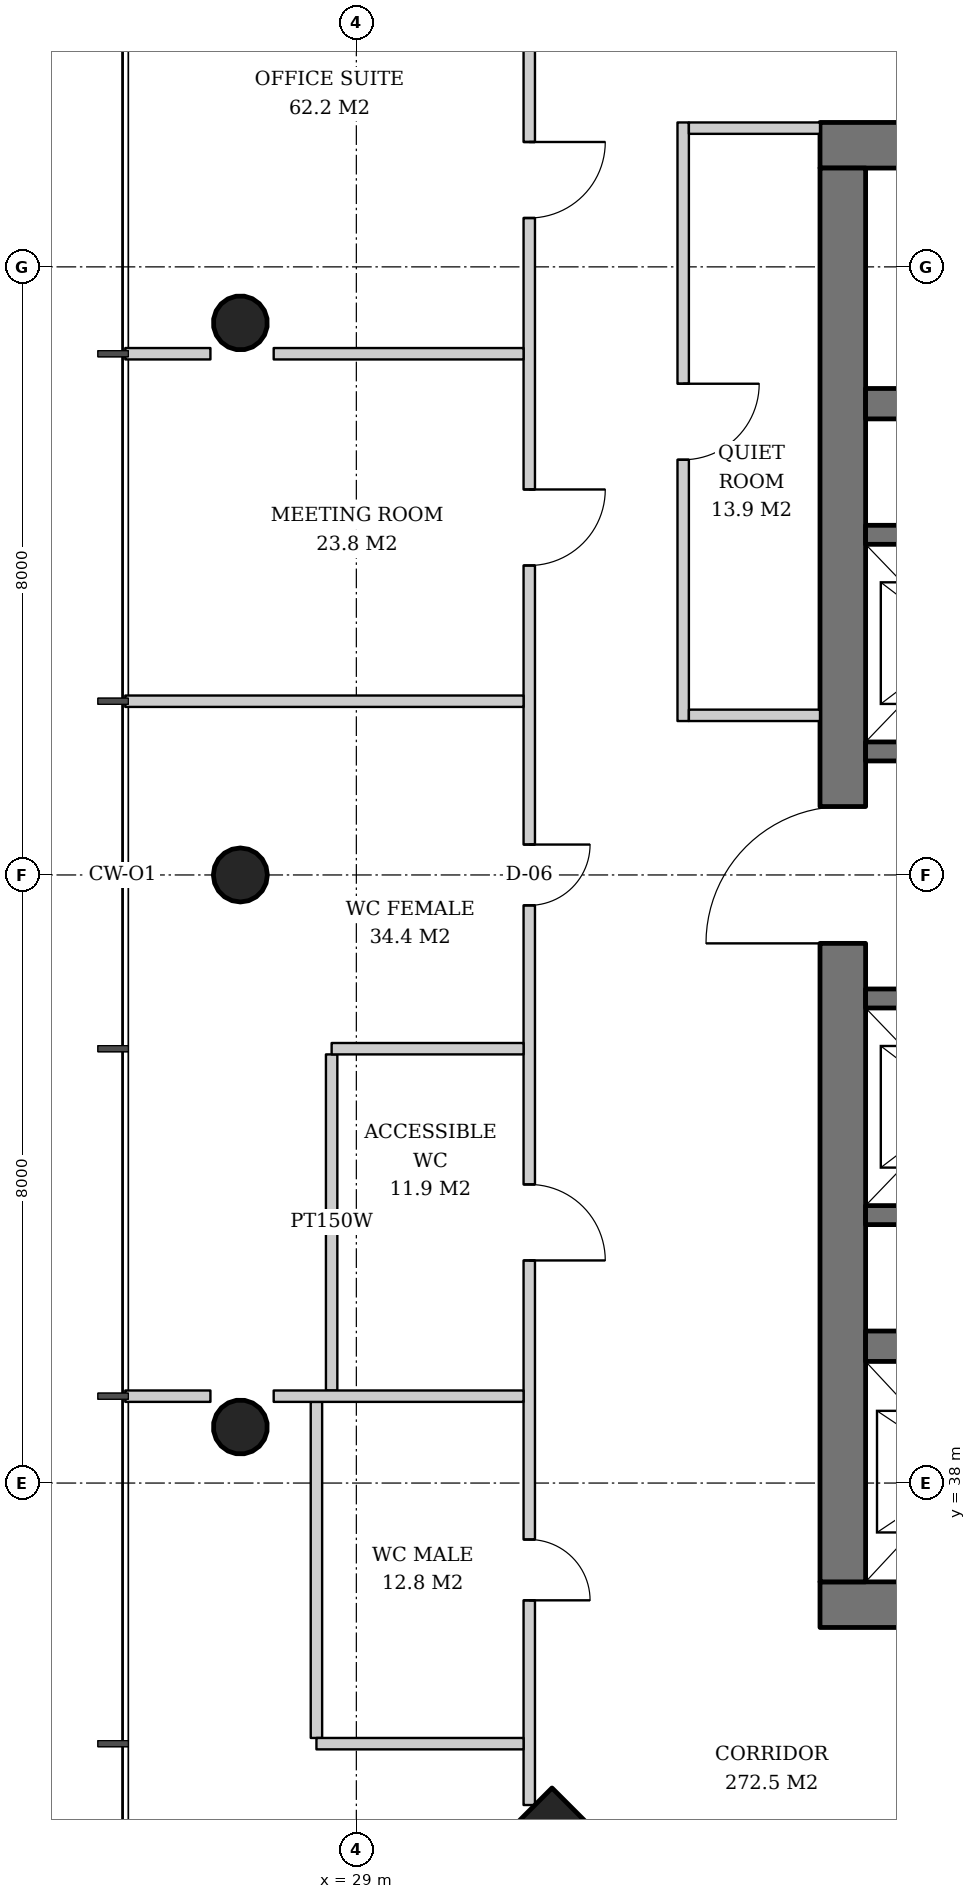
"""IFC4 building model, lengths in metres.
Left out: names, types, materials, properties, quantities, classifications, styles, units other than length and angle.
Written with IfcOpenShell. Run it as: python <this file> out.ifc"""

import sys

from ifc_helpers import new_model, si_unit, direction, frame, frame_2d, origin, origin_2d, place, context, subcontext, project, spatial, rectangle, hollow_circle, extrude, element, fill, save


model = new_model("IFC4")
c1 = context("Model", 3, precision=1e-05, world=origin(), true_north=direction((0.0, 1.0)))
c2 = subcontext(c1, "Body", "Model", "MODEL_VIEW")
j1 = project(units=[si_unit("LENGTHUNIT", "METRE"), si_unit("PLANEANGLEUNIT", "RADIAN")], contexts=[c1])
p1 = place(None, origin())
s1 = spatial("IfcSite", under=j1, at=p1, CompositionType="ELEMENT")
p2 = place(p1, origin())
s2 = spatial("IfcBuilding", under=s1, at=p2, CompositionType="ELEMENT")
p3 = place(p2, frame((0.0, 0.0, 222.4)))
s3 = spatial("IfcBuildingStorey", under=s2, at=p3, CompositionType="ELEMENT", Elevation=222.4)
p4 = place(p3, frame((31.536, 32.536, 0.0), z_axis=(0.031962158256, 0.031962158256, 0.998977898093), x_axis=(-0.707106781187, 0.707106781187, 0.0)))
e1 = element("IfcColumn", 1, at=p4, inside=s3, PredefinedType="COLUMN", context=c2, shape_type="SweptSolid", body=[
    extrude(rectangle(XDim=2.0, YDim=2.0, at=origin_2d()), origin(), (0.0, 0.0, 1.0), 3.804),
])
p5 = place(p3, frame((27.436, 53.282, 0.0), z_axis=(0.031910269556, -0.015987237665, 0.999362868496), x_axis=(0.447933021895, 0.894067115991, 0.0)))
e2 = element("IfcColumn", 2, at=p5, inside=s3, PredefinedType="COLUMN", context=c2, shape_type="SweptSolid", body=[
    extrude(hollow_circle(Radius=0.355, WallThickness=0.025, at=origin_2d()), origin(), (0.0, 0.0, 1.0), 3.802),
])
p6 = place(p3, frame((27.436, 46.0, 0.0), z_axis=(0.031914348339, 0.0, 0.999490607445), x_axis=(0.0, 1.0, 0.0)))
e3 = element("IfcColumn", 3, at=p6, inside=s3, PredefinedType="COLUMN", context=c2, shape_type="SweptSolid", body=[
    extrude(hollow_circle(Radius=0.355, WallThickness=0.025, at=origin_2d()), origin(), (0.0, 0.0, 1.0), 3.802),
])
p7 = place(p3, frame((27.436, 38.718, 0.0), z_axis=(0.031910269556, 0.015987237665, 0.999362868496), x_axis=(-0.447933021895, 0.894067115991, 0.0)))
e4 = element("IfcColumn", 4, at=p7, inside=s3, PredefinedType="COLUMN", context=c2, shape_type="SweptSolid", body=[
    extrude(hollow_circle(Radius=0.355, WallThickness=0.025, at=origin_2d()), origin(), (0.0, 0.0, 1.0), 3.802),
])
p8 = place(p3, frame((35.1, 36.4, 0.0), z_axis=(0.0, 0.0, 1.0), x_axis=(1.0, 0.0, 0.0)))
e5 = element("IfcWall", 5, at=p8, inside=s3, PredefinedType="SHEAR", context=c2, shape_type="SweptSolid", body=[
    extrude(rectangle(XDim=19.8, YDim=0.6, at=frame_2d((9.9, 0.0))), origin(), (0.0, 0.0, 1.0), 3.8),
])
p9 = place(p8, frame((3.9, 0.0, 0.0)))
e6 = element("IfcOpeningElement", 6, at=p9, cuts=e5, PredefinedType="OPENING", context=c2, shape_type="SweptSolid", body=[
    extrude(rectangle(XDim=1.0, YDim=2.1, at=frame_2d((0.5, 1.05))), frame((0.0, 0.31, 0.0), z_axis=(0.0, -1.0, 0.0), x_axis=(1.0, 0.0, 0.0)), (0.0, 0.0, 1.0), 0.62),
])
p10 = place(p8, frame((15.35, 0.0, 0.0)))
e7 = element("IfcOpeningElement", 7, at=p10, cuts=e5, PredefinedType="OPENING", context=c2, shape_type="SweptSolid", body=[
    extrude(rectangle(XDim=1.0, YDim=2.1, at=frame_2d((0.5, 1.05))), frame((0.0, 0.31, 0.0), z_axis=(0.0, -1.0, 0.0), x_axis=(1.0, 0.0, 0.0)), (0.0, 0.0, 1.0), 0.62),
])
p11 = place(p3, frame((35.1, 55.6, 0.0), z_axis=(0.0, 0.0, 1.0), x_axis=(1.0, 0.0, 0.0)))
e8 = element("IfcWall", 8, at=p11, inside=s3, PredefinedType="SHEAR", context=c2, shape_type="SweptSolid", body=[
    extrude(rectangle(XDim=19.8, YDim=0.6, at=frame_2d((9.9, 0.0))), origin(), (0.0, 0.0, 1.0), 3.8),
])
p12 = place(p11, frame((14.54, 0.0, 0.0)))
e9 = element("IfcOpeningElement", 9, at=p12, cuts=e8, PredefinedType="OPENING", context=c2, shape_type="SweptSolid", body=[
    extrude(rectangle(XDim=1.0, YDim=2.1, at=frame_2d((0.5, 1.05))), frame((0.0, 0.31, 0.0), z_axis=(0.0, -1.0, 0.0), x_axis=(1.0, 0.0, 0.0)), (0.0, 0.0, 1.0), 0.62),
])
p13 = place(p11, frame((1.8, 0.0, 0.0)))
e10 = element("IfcOpeningElement", 10, at=p13, cuts=e8, PredefinedType="OPENING", context=c2, shape_type="SweptSolid", body=[
    extrude(rectangle(XDim=1.0, YDim=2.1, at=frame_2d((0.5, 1.05))), frame((0.0, 0.31, 0.0), z_axis=(0.0, -1.0, 0.0), x_axis=(1.0, 0.0, 0.0)), (0.0, 0.0, 1.0), 0.62),
])
p14 = place(p11, frame((3.913, 0.0, 0.0)))
e11 = element("IfcOpeningElement", 11, at=p14, cuts=e8, PredefinedType="OPENING", context=c2, shape_type="SweptSolid", body=[
    extrude(rectangle(XDim=1.0, YDim=2.1, at=frame_2d((0.5, 1.05))), frame((0.0, 0.31, 0.0), z_axis=(0.0, -1.0, 0.0), x_axis=(1.0, 0.0, 0.0)), (0.0, 0.0, 1.0), 0.62),
])
p15 = place(p3, frame((35.4, 36.7, 0.0), z_axis=(0.0, 0.0, 1.0), x_axis=(0.0, 1.0, 0.0)))
e12 = element("IfcWall", 12, at=p15, inside=s3, PredefinedType="SHEAR", context=c2, shape_type="SweptSolid", body=[
    extrude(rectangle(XDim=18.6, YDim=0.6, at=frame_2d((9.3, 0.0))), origin(), (0.0, 0.0, 1.0), 3.8),
])
p16 = place(p15, frame((8.4, 0.0, 0.0)))
e13 = element("IfcOpeningElement", 13, at=p16, cuts=e12, PredefinedType="OPENING", context=c2, shape_type="SweptSolid", body=[
    extrude(rectangle(XDim=1.8, YDim=2.4, at=frame_2d((0.9, 1.2))), frame((0.0, 0.31, 0.0), z_axis=(0.0, -1.0, 0.0), x_axis=(1.0, 0.0, 0.0)), (0.0, 0.0, 1.0), 0.62),
])
for number, where, z_axis, x_axis in (
    (14, (35.7, 39.8, 0.0), (0.0, 0.0, 1.0), (1.0, 0.0, 0.0)),
    (15, (35.7, 52.2, 0.0), (0.0, 0.0, 1.0), (1.0, 0.0, 0.0)),
):
    element("IfcWall", number, at=place(p3, frame(where, z_axis=z_axis, x_axis=x_axis)), inside=s3, PredefinedType="SHEAR", context=c2, shape_type="SweptSolid", body=[
        extrude(rectangle(XDim=18.6, YDim=0.4, at=frame_2d((9.3, 0.0))), origin(), (0.0, 0.0, 1.0), 3.8),
    ])
p17 = place(p3, frame((35.7, 50.475, 0.0), z_axis=(0.0, 0.0, 1.0), x_axis=(1.0, 0.0, 0.0)))
e16 = element("IfcWall", 16, at=p17, inside=s3, PredefinedType="SHEAR", context=c2, shape_type="SweptSolid", body=[
    extrude(rectangle(XDim=11.0, YDim=0.25, at=frame_2d((5.5, 0.0))), origin(), (0.0, 0.0, 1.0), 3.8),
])
p18 = place(p3, frame((35.7, 47.625, 0.0), z_axis=(0.0, 0.0, 1.0), x_axis=(1.0, 0.0, 0.0)))
e17 = element("IfcWall", 17, at=p18, inside=s3, PredefinedType="SHEAR", context=c2, shape_type="SweptSolid", body=[
    extrude(rectangle(XDim=12.83, YDim=0.25, at=frame_2d((6.415, 0.0))), origin(), (0.0, 0.0, 1.0), 3.8),
])
p19 = place(p18, frame((0.7, 0.0, 0.0)))
e18 = element("IfcOpeningElement", 18, at=p19, cuts=e17, PredefinedType="OPENING", context=c2, shape_type="SweptSolid", body=[
    extrude(rectangle(XDim=1.1, YDim=2.2, at=frame_2d((0.55, 1.1))), frame((0.0, 0.135, 0.0), z_axis=(0.0, -1.0, 0.0), x_axis=(1.0, 0.0, 0.0)), (0.0, 0.0, 1.0), 0.27),
])
p20 = place(p18, frame((3.45, 0.0, 0.0)))
e19 = element("IfcOpeningElement", 19, at=p20, cuts=e17, PredefinedType="OPENING", context=c2, shape_type="SweptSolid", body=[
    extrude(rectangle(XDim=1.1, YDim=2.2, at=frame_2d((0.55, 1.1))), frame((0.0, 0.135, 0.0), z_axis=(0.0, -1.0, 0.0), x_axis=(1.0, 0.0, 0.0)), (0.0, 0.0, 1.0), 0.27),
])
p21 = place(p18, frame((6.2, 0.0, 0.0)))
e20 = element("IfcOpeningElement", 20, at=p21, cuts=e17, PredefinedType="OPENING", context=c2, shape_type="SweptSolid", body=[
    extrude(rectangle(XDim=1.1, YDim=2.2, at=frame_2d((0.55, 1.1))), frame((0.0, 0.135, 0.0), z_axis=(0.0, -1.0, 0.0), x_axis=(1.0, 0.0, 0.0)), (0.0, 0.0, 1.0), 0.27),
])
p22 = place(p18, frame((9.0, 0.0, 0.0)))
e21 = element("IfcOpeningElement", 21, at=p22, cuts=e17, PredefinedType="OPENING", context=c2, shape_type="SweptSolid", body=[
    extrude(rectangle(XDim=1.0, YDim=2.1, at=frame_2d((0.5, 1.05))), frame((0.0, 0.135, 0.0), z_axis=(0.0, -1.0, 0.0), x_axis=(1.0, 0.0, 0.0)), (0.0, 0.0, 1.0), 0.27),
])
p23 = place(p18, frame((11.515, 0.0, 0.0)))
e22 = element("IfcOpeningElement", 22, at=p23, cuts=e17, PredefinedType="OPENING", context=c2, shape_type="SweptSolid", body=[
    extrude(rectangle(XDim=0.8, YDim=2.0, at=frame_2d((0.4, 1.0))), frame((0.0, 0.135, 0.0), z_axis=(0.0, -1.0, 0.0), x_axis=(1.0, 0.0, 0.0)), (0.0, 0.0, 1.0), 0.27),
])
p24 = place(p3, frame((35.7, 41.525, 0.0), z_axis=(0.0, 0.0, 1.0), x_axis=(1.0, 0.0, 0.0)))
e23 = element("IfcWall", 23, at=p24, inside=s3, PredefinedType="SHEAR", context=c2, shape_type="SweptSolid", body=[
    extrude(rectangle(XDim=11.0, YDim=0.25, at=frame_2d((5.5, 0.0))), origin(), (0.0, 0.0, 1.0), 3.8),
])
p25 = place(p3, frame((35.7, 44.375, 0.0), z_axis=(0.0, 0.0, 1.0), x_axis=(1.0, 0.0, 0.0)))
e24 = element("IfcWall", 24, at=p25, inside=s3, PredefinedType="SHEAR", context=c2, shape_type="SweptSolid", body=[
    extrude(rectangle(XDim=12.83, YDim=0.25, at=frame_2d((6.415, 0.0))), origin(), (0.0, 0.0, 1.0), 3.8),
])
p26 = place(p25, frame((0.7, 0.0, 0.0)))
e25 = element("IfcOpeningElement", 25, at=p26, cuts=e24, PredefinedType="OPENING", context=c2, shape_type="SweptSolid", body=[
    extrude(rectangle(XDim=1.1, YDim=2.2, at=frame_2d((0.55, 1.1))), frame((0.0, 0.135, 0.0), z_axis=(0.0, -1.0, 0.0), x_axis=(1.0, 0.0, 0.0)), (0.0, 0.0, 1.0), 0.27),
])
p27 = place(p25, frame((3.45, 0.0, 0.0)))
e26 = element("IfcOpeningElement", 26, at=p27, cuts=e24, PredefinedType="OPENING", context=c2, shape_type="SweptSolid", body=[
    extrude(rectangle(XDim=1.1, YDim=2.2, at=frame_2d((0.55, 1.1))), frame((0.0, 0.135, 0.0), z_axis=(0.0, -1.0, 0.0), x_axis=(1.0, 0.0, 0.0)), (0.0, 0.0, 1.0), 0.27),
])
p28 = place(p25, frame((6.2, 0.0, 0.0)))
e27 = element("IfcOpeningElement", 27, at=p28, cuts=e24, PredefinedType="OPENING", context=c2, shape_type="SweptSolid", body=[
    extrude(rectangle(XDim=1.1, YDim=2.2, at=frame_2d((0.55, 1.1))), frame((0.0, 0.135, 0.0), z_axis=(0.0, -1.0, 0.0), x_axis=(1.0, 0.0, 0.0)), (0.0, 0.0, 1.0), 0.27),
])
p29 = place(p25, frame((9.0, 0.0, 0.0)))
e28 = element("IfcOpeningElement", 28, at=p29, cuts=e24, PredefinedType="OPENING", context=c2, shape_type="SweptSolid", body=[
    extrude(rectangle(XDim=1.0, YDim=2.1, at=frame_2d((0.5, 1.05))), frame((0.0, 0.135, 0.0), z_axis=(0.0, -1.0, 0.0), x_axis=(1.0, 0.0, 0.0)), (0.0, 0.0, 1.0), 0.27),
])
p30 = place(p25, frame((11.515, 0.0, 0.0)))
e29 = element("IfcOpeningElement", 29, at=p30, cuts=e24, PredefinedType="OPENING", context=c2, shape_type="SweptSolid", body=[
    extrude(rectangle(XDim=0.8, YDim=2.0, at=frame_2d((0.4, 1.0))), frame((0.0, 0.135, 0.0), z_axis=(0.0, -1.0, 0.0), x_axis=(1.0, 0.0, 0.0)), (0.0, 0.0, 1.0), 0.27),
])
p31 = place(p3, frame((33.3, 55.9, 0.0), z_axis=(0.0, 0.0, 1.0), x_axis=(0.0, -1.0, 0.0)))
e30 = element("IfcWall", 30, at=p31, inside=s3, PredefinedType="PARTITIONING", context=c2, shape_type="SweptSolid", body=[
    extrude(rectangle(XDim=7.875, YDim=0.15, at=frame_2d((3.938, 0.0))), origin(), (0.0, 0.0, 1.0), 2.706),
])
p32 = place(p31, frame((3.438, 0.0, 0.0)))
e31 = element("IfcOpeningElement", 31, at=p32, cuts=e30, PredefinedType="OPENING", context=c2, shape_type="SweptSolid", body=[
    extrude(rectangle(XDim=1.0, YDim=2.1, at=frame_2d((0.5, 1.05))), frame((0.0, 0.085, 0.0), z_axis=(0.0, -1.0, 0.0), x_axis=(1.0, 0.0, 0.0)), (0.0, 0.0, 1.0), 0.17),
])
p33 = place(p3, frame((35.1, 55.825, 0.0), z_axis=(0.0, 0.0, 1.0), x_axis=(-1.0, 0.0, 0.0)))
e32 = element("IfcWall", 32, at=p33, inside=s3, PredefinedType="PARTITIONING", context=c2, shape_type="SweptSolid", body=[
    extrude(rectangle(XDim=1.725, YDim=0.15, at=frame_2d((0.863, 0.0))), origin(), (0.0, 0.0, 1.0), 2.92),
])
p34 = place(p3, frame((35.1, 48.1, 0.0), z_axis=(0.0, 0.0, 1.0), x_axis=(-1.0, 0.0, 0.0)))
e33 = element("IfcWall", 33, at=p34, inside=s3, PredefinedType="PARTITIONING", context=c2, shape_type="SweptSolid", body=[
    extrude(rectangle(XDim=1.725, YDim=0.15, at=frame_2d((0.863, 0.0))), origin(), (0.0, 0.0, 1.0), 3.52),
])
p35 = place(p3, frame((28.675, 43.639, 0.0), z_axis=(0.0, 0.0, 1.0), x_axis=(0.0, -1.0, 0.0)))
e34 = element("IfcWall", 34, at=p35, inside=s3, PredefinedType="PARTITIONING", context=c2, shape_type="SweptSolid", body=[
    extrude(rectangle(XDim=4.422, YDim=0.15, at=frame_2d((2.211, 0.0))), origin(), (0.0, 0.0, 1.0), 2.706),
])
p36 = place(p3, frame((28.475, 39.068, 0.0), z_axis=(0.0, 0.0, 1.0), x_axis=(0.0, -1.0, 0.0)))
e35 = element("IfcWall", 35, at=p36, inside=s3, PredefinedType="PARTITIONING", context=c2, shape_type="SweptSolid", body=[
    extrude(rectangle(XDim=4.421, YDim=0.15, at=frame_2d((2.211, 0.0))), origin(), (0.0, 0.0, 1.0), 2.706),
])
p37 = place(p3, frame((31.275, 58.236, 0.0), z_axis=(0.0, 0.0, 1.0), x_axis=(0.0, -1.0, 0.0)))
e36 = element("IfcWall", 36, at=p37, inside=s3, PredefinedType="PARTITIONING", context=c2, shape_type="SweptSolid", body=[
    extrude(rectangle(XDim=24.472, YDim=0.15, at=frame_2d((12.236, 0.0))), origin(), (0.0, 0.0, 1.0), 2.706),
])
p38 = place(p37, frame((2.593, 0.0, 0.0)))
e37 = element("IfcOpeningElement", 37, at=p38, cuts=e36, PredefinedType="OPENING", context=c2, shape_type="SweptSolid", body=[
    extrude(rectangle(XDim=1.0, YDim=2.1, at=frame_2d((0.5, 1.05))), frame((0.0, 0.085, 0.0), z_axis=(0.0, -1.0, 0.0), x_axis=(1.0, 0.0, 0.0)), (0.0, 0.0, 1.0), 0.17),
])
p39 = place(p37, frame((7.164, 0.0, 0.0)))
e38 = element("IfcOpeningElement", 38, at=p39, cuts=e36, PredefinedType="OPENING", context=c2, shape_type="SweptSolid", body=[
    extrude(rectangle(XDim=1.0, YDim=2.1, at=frame_2d((0.5, 1.05))), frame((0.0, 0.085, 0.0), z_axis=(0.0, -1.0, 0.0), x_axis=(1.0, 0.0, 0.0)), (0.0, 0.0, 1.0), 0.17),
])
p40 = place(p37, frame((11.836, 0.0, 0.0)))
e39 = element("IfcOpeningElement", 39, at=p40, cuts=e36, PredefinedType="OPENING", context=c2, shape_type="SweptSolid", body=[
    extrude(rectangle(XDim=0.8, YDim=2.1, at=frame_2d((0.4, 1.05))), frame((0.0, 0.085, 0.0), z_axis=(0.0, -1.0, 0.0), x_axis=(1.0, 0.0, 0.0)), (0.0, 0.0, 1.0), 0.17),
])
p41 = place(p37, frame((16.307, 0.0, 0.0)))
e40 = element("IfcOpeningElement", 40, at=p41, cuts=e36, PredefinedType="OPENING", context=c2, shape_type="SweptSolid", body=[
    extrude(rectangle(XDim=1.0, YDim=2.1, at=frame_2d((0.5, 1.05))), frame((0.0, 0.085, 0.0), z_axis=(0.0, -1.0, 0.0), x_axis=(1.0, 0.0, 0.0)), (0.0, 0.0, 1.0), 0.17),
])
p42 = place(p37, frame((20.979, 0.0, 0.0)))
e41 = element("IfcOpeningElement", 41, at=p42, cuts=e36, PredefinedType="OPENING", context=c2, shape_type="SweptSolid", body=[
    extrude(rectangle(XDim=0.8, YDim=2.1, at=frame_2d((0.4, 1.05))), frame((0.0, 0.085, 0.0), z_axis=(0.0, -1.0, 0.0), x_axis=(1.0, 0.0, 0.0)), (0.0, 0.0, 1.0), 0.17),
])
p43 = place(p3, frame((31.2, 52.857, 0.0), z_axis=(0.0, 0.0, 1.0), x_axis=(-1.0, 0.0, 0.0)))
e42 = element("IfcWall", 42, at=p43, inside=s3, PredefinedType="PARTITIONING", context=c2, shape_type="SweptSolid", body=[
    extrude(rectangle(XDim=3.287, YDim=0.15, at=frame_2d((1.644, 0.0))), origin(), (0.0, 0.0, 1.0), 3.52),
])
p44 = place(p3, frame((27.08, 52.857, 0.0), z_axis=(0.0, 0.0, 1.0), x_axis=(-1.0, 0.0, 0.0)))
e43 = element("IfcWall", 43, at=p44, inside=s3, PredefinedType="PARTITIONING", context=c2, shape_type="SweptSolid", body=[
    extrude(rectangle(XDim=1.12, YDim=0.15, at=frame_2d((0.56, 0.0))), origin(), (0.0, 0.0, 1.0), 3.52),
])
p45 = place(p3, frame((31.2, 48.286, 0.0), z_axis=(0.0, 0.0, 1.0), x_axis=(-1.0, 0.0, 0.0)))
e44 = element("IfcWall", 44, at=p45, inside=s3, PredefinedType="PARTITIONING", context=c2, shape_type="SweptSolid", body=[
    extrude(rectangle(XDim=5.24, YDim=0.15, at=frame_2d((2.62, 0.0))), origin(), (0.0, 0.0, 1.0), 3.52),
])
p46 = place(p3, frame((31.2, 43.714, 0.0), z_axis=(0.0, 0.0, 1.0), x_axis=(-1.0, 0.0, 0.0)))
e45 = element("IfcWall", 45, at=p46, inside=s3, PredefinedType="PARTITIONING", context=c2, shape_type="SweptSolid", body=[
    extrude(rectangle(XDim=2.525, YDim=0.15, at=frame_2d((1.262, 0.0))), origin(), (0.0, 0.0, 1.0), 3.52),
])
p47 = place(p3, frame((31.2, 39.143, 0.0), z_axis=(0.0, 0.0, 1.0), x_axis=(-1.0, 0.0, 0.0)))
e46 = element("IfcWall", 46, at=p47, inside=s3, PredefinedType="PARTITIONING", context=c2, shape_type="SweptSolid", body=[
    extrude(rectangle(XDim=3.287, YDim=0.15, at=frame_2d((1.644, 0.0))), origin(), (0.0, 0.0, 1.0), 3.52),
])
p48 = place(p3, frame((27.08, 39.143, 0.0), z_axis=(0.0, 0.0, 1.0), x_axis=(-1.0, 0.0, 0.0)))
e47 = element("IfcWall", 47, at=p48, inside=s3, PredefinedType="PARTITIONING", context=c2, shape_type="SweptSolid", body=[
    extrude(rectangle(XDim=1.12, YDim=0.15, at=frame_2d((0.56, 0.0))), origin(), (0.0, 0.0, 1.0), 3.52),
])
p49 = place(p3, frame((31.2, 34.572, 0.0), z_axis=(0.0, 0.0, 1.0), x_axis=(-1.0, 0.0, 0.0)))
e48 = element("IfcWall", 48, at=p49, inside=s3, PredefinedType="PARTITIONING", context=c2, shape_type="SweptSolid", body=[
    extrude(rectangle(XDim=2.725, YDim=0.15, at=frame_2d((1.362, 0.0))), origin(), (0.0, 0.0, 1.0), 3.52),
])
p50 = place(p16, origin())
e49 = element("IfcDoor", 49, at=p50, inside=s3, OperationType="DOUBLE_DOOR_SINGLE_SWING", PredefinedType="DOOR", context=c2, shape_type="SweptSolid", body=[
    extrude(rectangle(XDim=1.8, YDim=2.4, at=frame_2d((0.9, 1.2))), frame((0.0, 0.025, 0.0), z_axis=(0.0, -1.0, 0.0), x_axis=(1.0, 0.0, 0.0)), (0.0, 0.0, 1.0), 0.05),
])
fill(e13, e49)
p51 = place(p32, origin())
e50 = element("IfcDoor", 50, at=p51, inside=s3, OperationType="SINGLE_SWING_LEFT", PredefinedType="DOOR", context=c2, shape_type="SweptSolid", body=[
    extrude(rectangle(XDim=1.0, YDim=2.1, at=frame_2d((0.5, 1.05))), frame((0.0, 0.025, 0.0), z_axis=(0.0, -1.0, 0.0), x_axis=(1.0, 0.0, 0.0)), (0.0, 0.0, 1.0), 0.05),
])
fill(e31, e50)
p52 = place(p38, origin())
e51 = element("IfcDoor", 51, at=p52, inside=s3, OperationType="SINGLE_SWING_LEFT", PredefinedType="DOOR", context=c2, shape_type="SweptSolid", body=[
    extrude(rectangle(XDim=1.0, YDim=2.1, at=frame_2d((0.5, 1.05))), frame((0.0, 0.025, 0.0), z_axis=(0.0, -1.0, 0.0), x_axis=(1.0, 0.0, 0.0)), (0.0, 0.0, 1.0), 0.05),
])
fill(e37, e51)
p53 = place(p39, origin())
e52 = element("IfcDoor", 52, at=p53, inside=s3, OperationType="SINGLE_SWING_LEFT", PredefinedType="DOOR", context=c2, shape_type="SweptSolid", body=[
    extrude(rectangle(XDim=1.0, YDim=2.1, at=frame_2d((0.5, 1.05))), frame((0.0, 0.025, 0.0), z_axis=(0.0, -1.0, 0.0), x_axis=(1.0, 0.0, 0.0)), (0.0, 0.0, 1.0), 0.05),
])
fill(e38, e52)
p54 = place(p40, origin())
e53 = element("IfcDoor", 53, at=p54, inside=s3, OperationType="SINGLE_SWING_LEFT", PredefinedType="DOOR", context=c2, shape_type="SweptSolid", body=[
    extrude(rectangle(XDim=0.8, YDim=2.1, at=frame_2d((0.4, 1.05))), frame((0.0, 0.025, 0.0), z_axis=(0.0, -1.0, 0.0), x_axis=(1.0, 0.0, 0.0)), (0.0, 0.0, 1.0), 0.05),
])
fill(e39, e53)
p55 = place(p41, origin())
e54 = element("IfcDoor", 54, at=p55, inside=s3, OperationType="SINGLE_SWING_RIGHT", PredefinedType="DOOR", context=c2, shape_type="SweptSolid", body=[
    extrude(rectangle(XDim=1.0, YDim=2.1, at=frame_2d((0.5, 1.05))), frame((0.0, 0.025, 0.0), z_axis=(0.0, -1.0, 0.0), x_axis=(1.0, 0.0, 0.0)), (0.0, 0.0, 1.0), 0.05),
])
fill(e40, e54)
p56 = place(p42, origin())
e55 = element("IfcDoor", 55, at=p56, inside=s3, OperationType="SINGLE_SWING_RIGHT", PredefinedType="DOOR", context=c2, shape_type="SweptSolid", body=[
    extrude(rectangle(XDim=0.8, YDim=2.1, at=frame_2d((0.4, 1.05))), frame((0.0, 0.025, 0.0), z_axis=(0.0, -1.0, 0.0), x_axis=(1.0, 0.0, 0.0)), (0.0, 0.0, 1.0), 0.05),
])
fill(e41, e55)
save(model, sys.argv[1])
